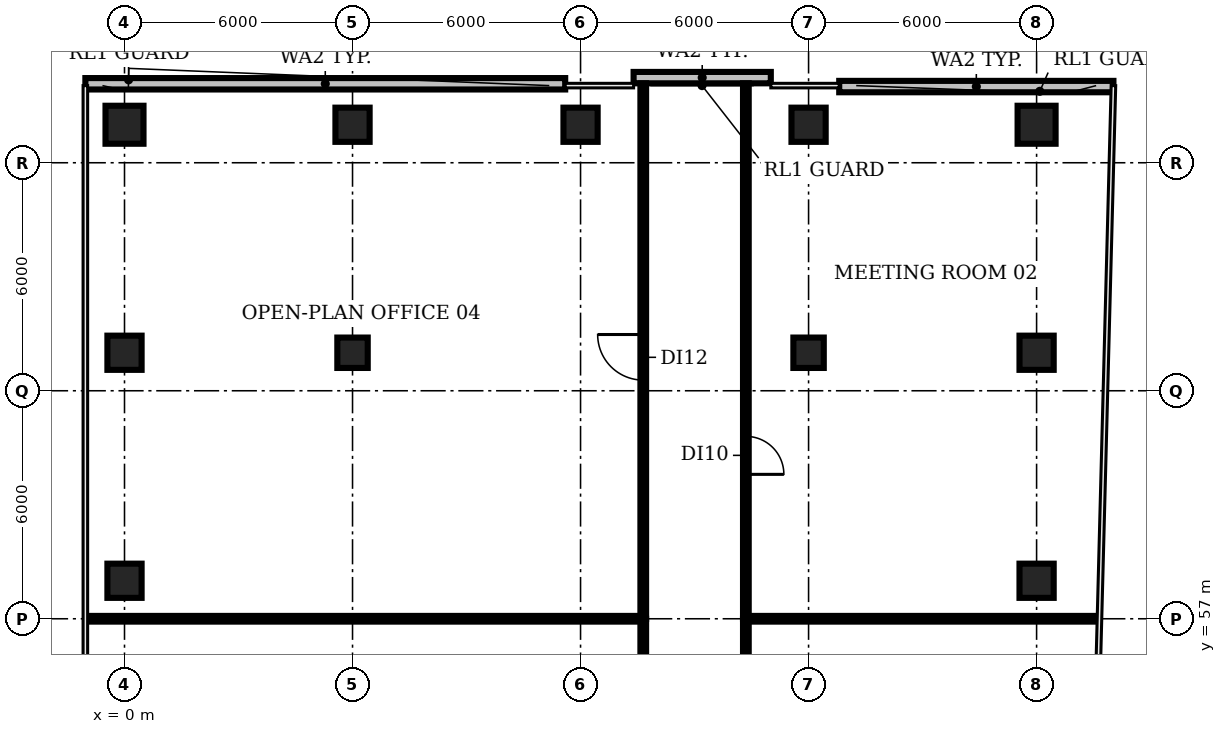
"""IFC4 building model, lengths in metres.
Left out: names, types, materials, properties, quantities, classifications, styles, units other than length and angle.
Written with IfcOpenShell. Run it as: python <this file> out.ifc"""

import sys

from ifc_helpers import new_model, si_unit, direction, frame, frame_2d, origin, origin_2d, place, context, subcontext, project, spatial, rectangle, circle, extrude, element, fill, save


model = new_model("IFC4")
c1 = context("Model", 3, precision=1e-05, world=origin(), true_north=direction((0.0, 1.0)))
c2 = subcontext(c1, "Body", "Model", "MODEL_VIEW")
j1 = project(units=[si_unit("LENGTHUNIT", "METRE"), si_unit("PLANEANGLEUNIT", "RADIAN")], contexts=[c1])
p1 = place(None, origin())
s1 = spatial("IfcSite", under=j1, at=p1, CompositionType="ELEMENT")
p2 = place(p1, origin())
s2 = spatial("IfcBuilding", under=s1, at=p2, CompositionType="ELEMENT")
p3 = place(p2, frame((0.0, 0.0, 117.2)))
s3 = spatial("IfcBuildingStorey", under=s2, at=p3, CompositionType="ELEMENT", Elevation=117.2)
for number, where, z_axis, x_axis in (
    (1, (0.0, 58.0, 0.0), (0.0, 0.0, 1.0), (1.0, 0.0, 0.0)),
    (2, (0.0, 64.0, 0.0), (0.0, 0.0, 1.0), (1.0, 0.0, 0.0)),
):
    element("IfcColumn", number, at=place(p3, frame(where, z_axis=z_axis, x_axis=x_axis)), inside=s3, PredefinedType="COLUMN", context=c2, shape_type="SweptSolid", body=[
        extrude(rectangle(XDim=0.9, YDim=0.9, at=origin_2d()), origin(), (0.0, 0.0, 1.0), 3.85),
    ])
p4 = place(p3, frame((0.0, 70.0, 0.0), z_axis=(0.0, 0.0, 1.0), x_axis=(1.0, 0.0, 0.0)))
e3 = element("IfcColumn", 3, at=p4, inside=s3, PredefinedType="COLUMN", context=c2, shape_type="SweptSolid", body=[
    extrude(circle(Radius=0.5, at=origin_2d()), origin(), (0.0, 0.0, 1.0), 3.85),
])
p5 = place(p3, frame((6.0, 64.0, 0.0), z_axis=(0.0, 0.0, 1.0), x_axis=(1.0, 0.0, 0.0)))
e4 = element("IfcColumn", 4, at=p5, inside=s3, PredefinedType="COLUMN", context=c2, shape_type="SweptSolid", body=[
    extrude(rectangle(XDim=0.8, YDim=0.8, at=origin_2d()), origin(), (0.0, 0.0, 1.0), 3.85),
])
for number, where, z_axis, x_axis in (
    (5, (6.0, 70.0, 0.0), (0.0, 0.0, 1.0), (1.0, 0.0, 0.0)),
    (6, (12.0, 70.0, 0.0), (0.0, 0.0, 1.0), (1.0, 0.0, 0.0)),
):
    element("IfcColumn", number, at=place(p3, frame(where, z_axis=z_axis, x_axis=x_axis)), inside=s3, PredefinedType="COLUMN", context=c2, shape_type="SweptSolid", body=[
        extrude(rectangle(XDim=0.9, YDim=0.9, at=origin_2d()), origin(), (0.0, 0.0, 1.0), 3.85),
    ])
p6 = place(p3, frame((18.0, 64.0, 0.0), z_axis=(0.0, 0.0, 1.0), x_axis=(1.0, 0.0, 0.0)))
e7 = element("IfcColumn", 7, at=p6, inside=s3, PredefinedType="COLUMN", context=c2, shape_type="SweptSolid", body=[
    extrude(rectangle(XDim=0.8, YDim=0.8, at=origin_2d()), origin(), (0.0, 0.0, 1.0), 3.85),
])
for number, where, z_axis, x_axis in (
    (8, (18.0, 70.0, 0.0), (0.0, 0.0, 1.0), (1.0, 0.0, 0.0)),
    (9, (24.0, 58.0, 0.0), (0.0, 0.0, 1.0), (1.0, 0.0, 0.0)),
    (10, (24.0, 64.0, 0.0), (0.0, 0.0, 1.0), (1.0, 0.0, 0.0)),
):
    element("IfcColumn", number, at=place(p3, frame(where, z_axis=z_axis, x_axis=x_axis)), inside=s3, PredefinedType="COLUMN", context=c2, shape_type="SweptSolid", body=[
        extrude(rectangle(XDim=0.9, YDim=0.9, at=origin_2d()), origin(), (0.0, 0.0, 1.0), 3.85),
    ])
p7 = place(p3, frame((24.0, 70.0, 0.0), z_axis=(0.0, 0.0, 1.0), x_axis=(1.0, 0.0, 0.0)))
e11 = element("IfcColumn", 11, at=p7, inside=s3, PredefinedType="COLUMN", context=c2, shape_type="SweptSolid", body=[
    extrude(circle(Radius=0.5, at=origin_2d()), origin(), (0.0, 0.0, 1.0), 3.85),
])
p8 = place(p3, frame((26.022, 71.005, 0.0), z_axis=(0.0, 0.0, 1.0), x_axis=(-1.0, 0.0, 0.0)))
e12 = element("IfcWall", 12, at=p8, inside=s3, PredefinedType="SOLIDWALL", context=c2, shape_type="SweptSolid", body=[
    extrude(rectangle(XDim=7.216, YDim=0.3, at=frame_2d((3.608, 0.0))), origin(), (0.0, 0.0, 1.0), 3.85),
])
p9 = place(p3, frame((17.006, 71.24, 0.0), z_axis=(0.0, 0.0, 1.0), x_axis=(-1.0, 0.0, 0.0)))
e13 = element("IfcWall", 13, at=p9, inside=s3, PredefinedType="SOLIDWALL", context=c2, shape_type="SweptSolid", body=[
    extrude(rectangle(XDim=3.61, YDim=0.3, at=frame_2d((1.805, 0.0))), origin(), (0.0, 0.0, 1.0), 3.85),
])
p10 = place(p3, frame((11.596, 71.078, 0.0), z_axis=(0.0, 0.0, 1.0), x_axis=(-1.0, 0.0, 0.0)))
e14 = element("IfcWall", 14, at=p10, inside=s3, PredefinedType="SOLIDWALL", context=c2, shape_type="SweptSolid", body=[
    extrude(rectangle(XDim=12.626, YDim=0.3, at=frame_2d((6.313, 0.0))), origin(), (0.0, 0.0, 1.0), 3.85),
])
p11 = place(p3, frame((-0.98, 57.0, 0.0), z_axis=(0.0, 0.0, 1.0), x_axis=(1.0, 0.0, 0.0)))
e15 = element("IfcWall", 15, at=p11, inside=s3, PredefinedType="PARTITIONING", context=c2, shape_type="SweptSolid", body=[
    extrude(rectangle(XDim=14.63, YDim=0.15, at=frame_2d((7.315, 0.0))), origin(), (0.0, 0.0, 1.0), 2.83),
])
p12 = place(p3, frame((13.65, 51.0, 0.0), z_axis=(0.0, 0.0, 1.0), x_axis=(0.0, 1.0, 0.0)))
e16 = element("IfcWall", 16, at=p12, inside=s3, PredefinedType="PARTITIONING", context=c2, shape_type="SweptSolid", body=[
    extrude(rectangle(XDim=6.0, YDim=0.15, at=frame_2d((3.0, 0.0))), origin(), (0.0, 0.0, 1.0), 2.83),
])
p13 = place(p12, frame((2.4, 0.0, 0.0)))
e17 = element("IfcOpeningElement", 17, at=p13, cuts=e16, PredefinedType="OPENING", context=c2, shape_type="SweptSolid", body=[
    extrude(rectangle(XDim=1.0, YDim=2.1, at=frame_2d((0.5, 1.05))), frame((0.0, 0.085, 0.0), z_axis=(0.0, -1.0, 0.0), x_axis=(1.0, 0.0, 0.0)), (0.0, 0.0, 1.0), 0.17),
])
p14 = place(p3, frame((13.65, 57.0, 0.0), z_axis=(0.0, 0.0, 1.0), x_axis=(0.0, 1.0, 0.0)))
e18 = element("IfcWall", 18, at=p14, inside=s3, PredefinedType="PARTITIONING", context=c2, shape_type="SweptSolid", body=[
    extrude(rectangle(XDim=14.09, YDim=0.15, at=frame_2d((7.045, 0.0))), origin(), (0.0, 0.0, 1.0), 2.83),
])
p15 = place(p14, frame((6.28, 0.0, 0.0)))
e19 = element("IfcOpeningElement", 19, at=p15, cuts=e18, PredefinedType="OPENING", context=c2, shape_type="SweptSolid", body=[
    extrude(rectangle(XDim=1.2, YDim=2.1, at=frame_2d((0.6, 1.05))), frame((0.0, 0.085, 0.0), z_axis=(0.0, -1.0, 0.0), x_axis=(1.0, 0.0, 0.0)), (0.0, 0.0, 1.0), 0.17),
])
p16 = place(p3, frame((16.35, 57.0, 0.0), z_axis=(0.0, 0.0, 1.0), x_axis=(0.0, -1.0, 0.0)))
e20 = element("IfcWall", 20, at=p16, inside=s3, PredefinedType="PARTITIONING", context=c2, shape_type="SweptSolid", body=[
    extrude(rectangle(XDim=12.0, YDim=0.15, at=frame_2d((6.0, 0.0))), origin(), (0.0, 0.0, 1.0), 2.83),
])
p17 = place(p16, frame((7.0, 0.0, 0.0)))
e21 = element("IfcOpeningElement", 21, at=p17, cuts=e20, PredefinedType="OPENING", context=c2, shape_type="SweptSolid", body=[
    extrude(rectangle(XDim=1.2, YDim=2.1, at=frame_2d((0.6, 1.05))), frame((0.0, 0.085, 0.0), z_axis=(0.0, -1.0, 0.0), x_axis=(1.0, 0.0, 0.0)), (0.0, 0.0, 1.0), 0.17),
])
p18 = place(p3, frame((16.35, 57.0, 0.0), z_axis=(0.0, 0.0, 1.0), x_axis=(1.0, 0.0, 0.0)))
e22 = element("IfcWall", 22, at=p18, inside=s3, PredefinedType="PARTITIONING", context=c2, shape_type="SweptSolid", body=[
    extrude(rectangle(XDim=9.25, YDim=0.15, at=frame_2d((4.625, 0.0))), origin(), (0.0, 0.0, 1.0), 2.83),
])
p19 = place(p3, frame((16.35, 71.09, 0.0), z_axis=(0.0, 0.0, 1.0), x_axis=(0.0, -1.0, 0.0)))
e23 = element("IfcWall", 23, at=p19, inside=s3, PredefinedType="PARTITIONING", context=c2, shape_type="SweptSolid", body=[
    extrude(rectangle(XDim=14.09, YDim=0.15, at=frame_2d((7.045, 0.0))), origin(), (0.0, 0.0, 1.0), 2.83),
])
p20 = place(p19, frame((9.29, 0.0, 0.0)))
e24 = element("IfcOpeningElement", 24, at=p20, cuts=e23, PredefinedType="OPENING", context=c2, shape_type="SweptSolid", body=[
    extrude(rectangle(XDim=1.0, YDim=2.1, at=frame_2d((0.5, 1.05))), frame((0.0, 0.085, 0.0), z_axis=(0.0, -1.0, 0.0), x_axis=(1.0, 0.0, 0.0)), (0.0, 0.0, 1.0), 0.17),
])
p21 = place(p15, origin())
e25 = element("IfcDoor", 25, at=p21, inside=s3, OperationType="SINGLE_SWING_RIGHT", PredefinedType="DOOR", context=c2, shape_type="SweptSolid", body=[
    extrude(rectangle(XDim=1.2, YDim=2.1, at=frame_2d((0.6, 1.05))), frame((0.0, 0.025, 0.0), z_axis=(0.0, -1.0, 0.0), x_axis=(1.0, 0.0, 0.0)), (0.0, 0.0, 1.0), 0.05),
])
fill(e19, e25)
p22 = place(p20, origin())
e26 = element("IfcDoor", 26, at=p22, inside=s3, OperationType="SINGLE_SWING_RIGHT", PredefinedType="DOOR", context=c2, shape_type="SweptSolid", body=[
    extrude(rectangle(XDim=1.0, YDim=2.1, at=frame_2d((0.5, 1.05))), frame((0.0, 0.025, 0.0), z_axis=(0.0, -1.0, 0.0), x_axis=(1.0, 0.0, 0.0)), (0.0, 0.0, 1.0), 0.05),
])
fill(e24, e26)
save(model, sys.argv[1])
